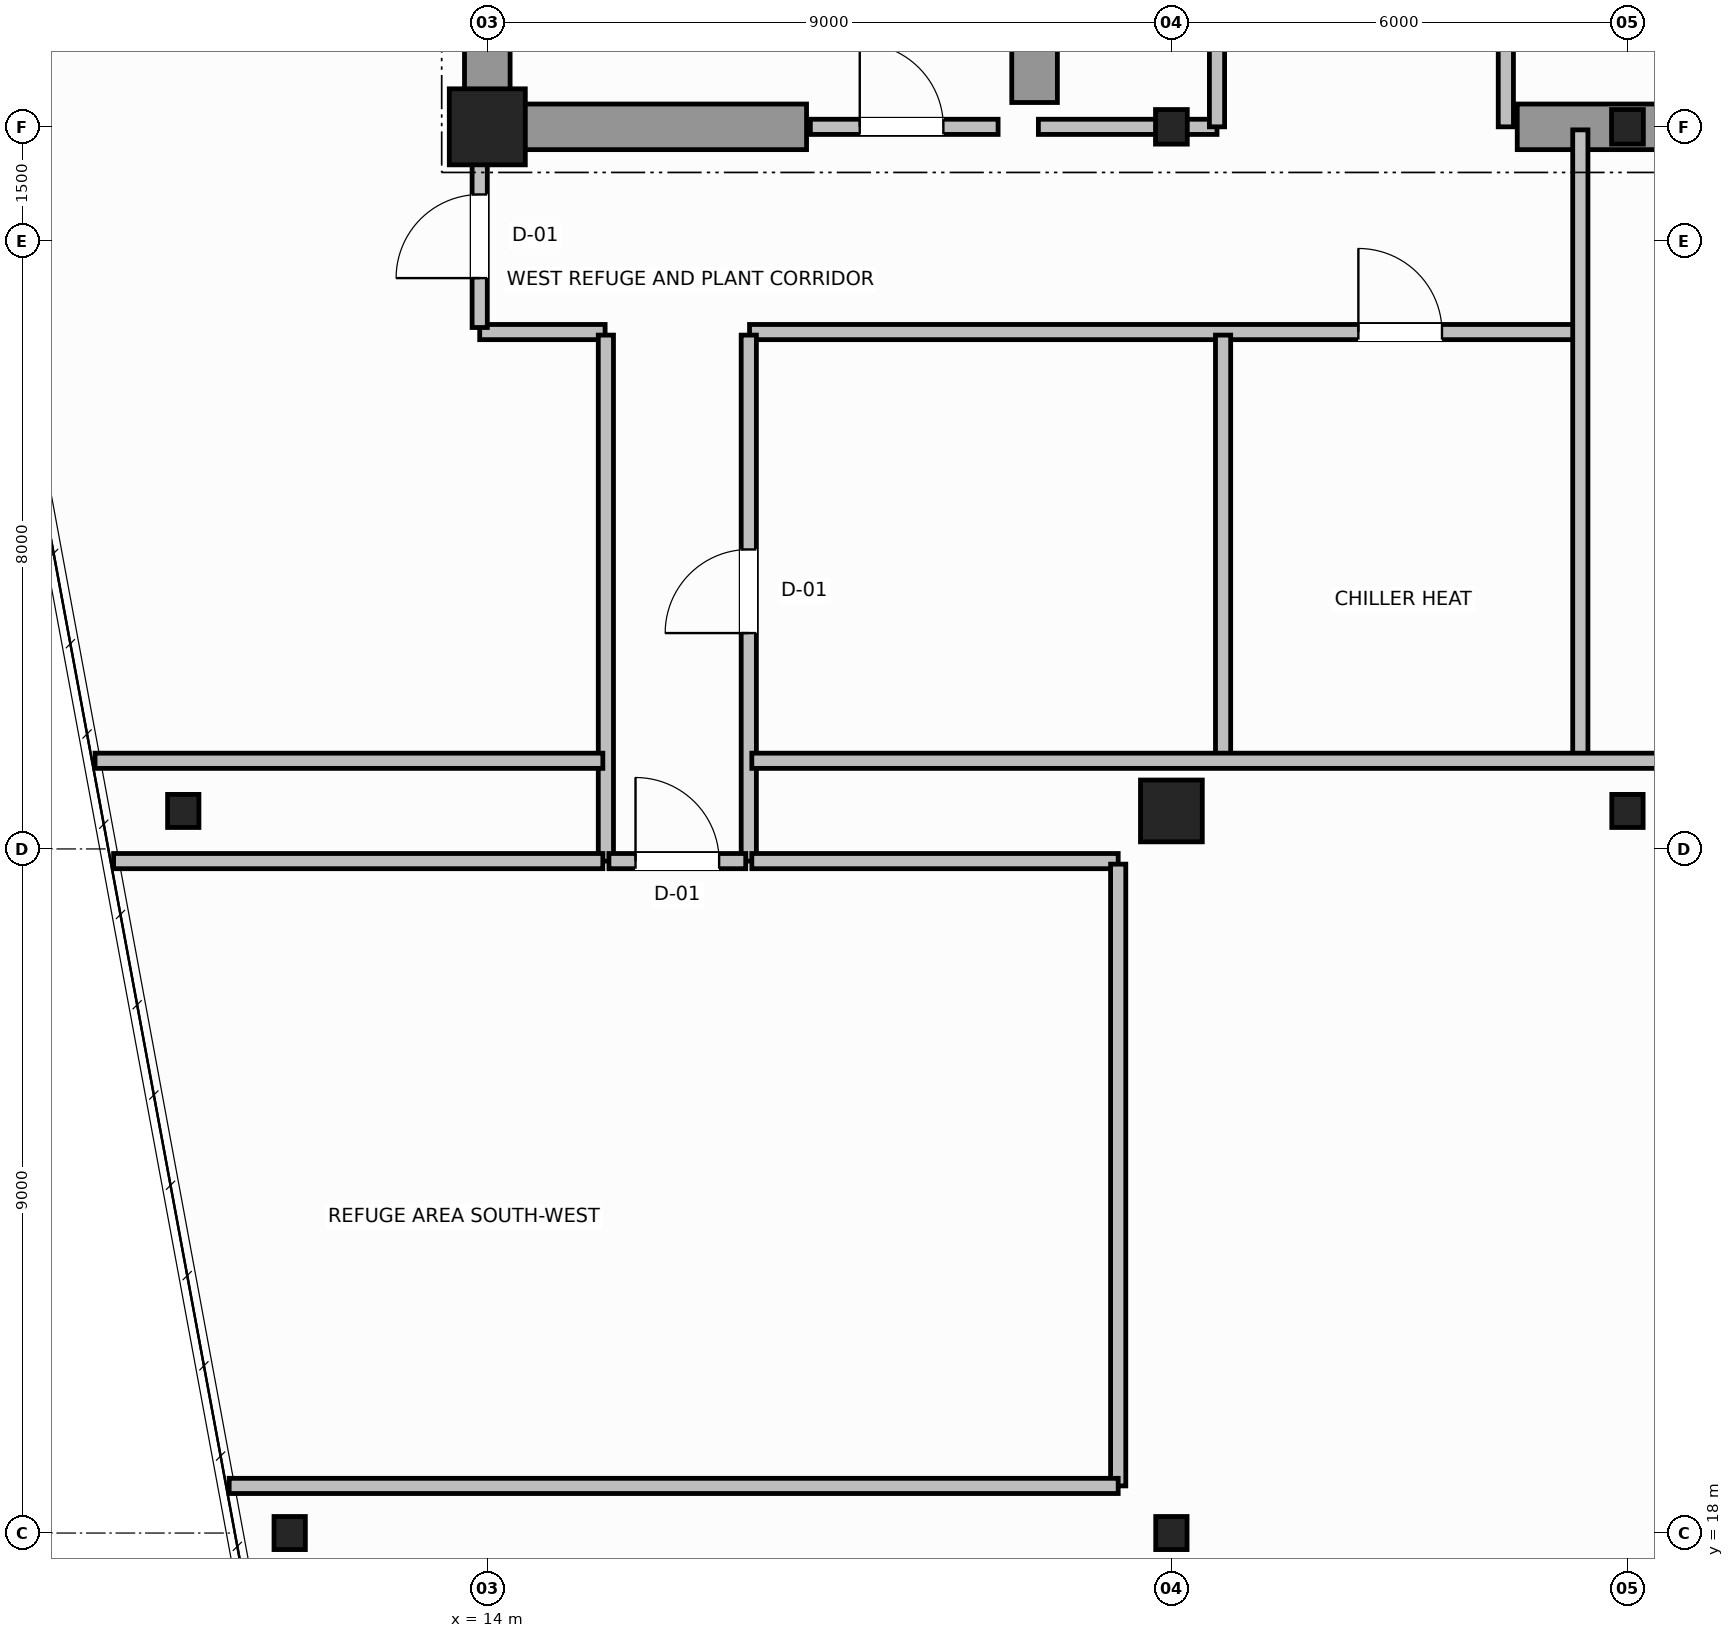
"""IFC4 building model, lengths in metres.
Left out: names, types, materials, properties, quantities, classifications, styles, units other than length and angle.
Written with IfcOpenShell. Run it as: python <this file> out.ifc"""

import sys

from ifc_helpers import new_model, si_unit, direction, frame, frame_2d, origin, origin_2d, place, context, subcontext, project, spatial, rectangle, hollow_circle, i_section, extrude, source, transform, mapped, element, fill, save


model = new_model("IFC4")
c1 = context("Model", 3, precision=1e-05, world=origin(), true_north=direction((0.0, 1.0)))
c2 = subcontext(c1, "Body", "Model", "MODEL_VIEW")
j1 = project(units=[si_unit("LENGTHUNIT", "METRE"), si_unit("PLANEANGLEUNIT", "RADIAN")], contexts=[c1])
p1 = place(None, origin())
s1 = spatial("IfcSite", under=j1, at=p1, CompositionType="ELEMENT")
p2 = place(p1, origin())
s2 = spatial("IfcBuilding", under=s1, at=p2, CompositionType="ELEMENT")
p3 = place(p2, frame((0.0, 0.0, 218.4)))
s3 = spatial("IfcBuildingStorey", under=s2, at=p3, CompositionType="ELEMENT", Elevation=218.4)
m1 = source(origin(), c2, "Body", "SweptSolid", [
    extrude(rectangle(XDim=1.0, YDim=1.0, at=origin_2d()), origin(), (0.0, 0.0, 1.0), 4.8),
])
p4 = place(p3, frame((14.0, 36.5, 0.0), z_axis=(0.0, 0.0, 1.0), x_axis=(1.0, 0.0, 0.0)))
e1 = element("IfcColumn", 1, at=p4, inside=s3, PredefinedType="COLUMN", context=c2, shape_type="MappedRepresentation", body=[
    mapped(m1, transform((0.0, 0.0, 0.0), scale=1.0)),
])
m2 = source(origin(), c2, "Body", "SweptSolid", [
    extrude(i_section(OverallWidth=0.418, OverallDepth=0.455, WebThickness=0.042, FlangeThickness=0.058, FilletRadius=0.015, at=origin_2d()), origin(), (0.0, 0.0, 1.0), 4.8),
])
for number, where, z_axis, x_axis in (
    (2, (23.0, 36.5, 0.0), (0.0, 0.0, 1.0), (1.0, 0.0, 0.0)),
    (3, (29.0, 36.5, 0.0), (0.0, 0.0, 1.0), (1.0, 0.0, 0.0)),
):
    element("IfcColumn", number, at=place(p3, frame(where, z_axis=z_axis, x_axis=x_axis)), inside=s3, PredefinedType="COLUMN", context=c2, shape_type="MappedRepresentation", body=[
        mapped(m2, transform((0.0, 0.0, 0.0), scale=1.0)),
    ])
m3 = source(origin(), c2, "Body", "SweptSolid", [
    extrude(i_section(OverallWidth=0.412, OverallDepth=0.435, WebThickness=0.036, FlangeThickness=0.05, FilletRadius=0.015, at=origin_2d()), origin(), (0.0, 0.0, 1.0), 4.8),
])
for number, where, z_axis, x_axis in (
    (4, (10.0, 27.5, 0.0), (0.0, 0.0, 1.0), (1.0, 0.0, 0.0)),
    (5, (11.4, 18.0, 0.0), (0.0, 0.0, 1.0), (1.0, 0.0, 0.0)),
):
    element("IfcColumn", number, at=place(p3, frame(where, z_axis=z_axis, x_axis=x_axis)), inside=s3, PredefinedType="COLUMN", context=c2, shape_type="MappedRepresentation", body=[
        mapped(m3, transform((0.0, 0.0, 0.0), scale=1.0)),
    ])
m4 = source(origin(), c2, "Body", "SweptSolid", [
    extrude(hollow_circle(Radius=0.406, WallThickness=0.04, at=origin_2d()), origin(), (0.0, 0.0, 1.0), 4.8),
])
p5 = place(p3, frame((23.0, 27.5, 0.0), z_axis=(0.0, 0.0, 1.0), x_axis=(1.0, 0.0, 0.0)))
e6 = element("IfcColumn", 6, at=p5, inside=s3, PredefinedType="COLUMN", context=c2, shape_type="MappedRepresentation", body=[
    mapped(m4, transform((0.0, 0.0, 0.0), scale=1.0)),
])
m5 = source(origin(), c2, "Body", "SweptSolid", [
    extrude(i_section(OverallWidth=0.412, OverallDepth=0.435, WebThickness=0.036, FlangeThickness=0.05, FilletRadius=0.015, at=origin_2d()), origin(), (0.0, 0.0, 1.0), 4.8),
])
for number, where, z_axis, x_axis in (
    (7, (29.0, 27.5, 0.0), (0.0, 0.0, 1.0), (1.0, 0.0, 0.0)),
    (8, (23.0, 18.0, 0.0), (0.0, 0.0, 1.0), (1.0, 0.0, 0.0)),
):
    element("IfcColumn", number, at=place(p3, frame(where, z_axis=z_axis, x_axis=x_axis)), inside=s3, PredefinedType="COLUMN", context=c2, shape_type="MappedRepresentation", body=[
        mapped(m5, transform((0.0, 0.0, 0.0), scale=1.0)),
    ])
p6 = place(p3, frame((14.0, 36.5, 0.0), z_axis=(0.0, 0.0, 1.0), x_axis=(0.0, 1.0, 0.0)))
e9 = element("IfcWall", 9, at=p6, inside=s3, PredefinedType="SHEAR", context=c2, shape_type="SweptSolid", body=[
    extrude(rectangle(XDim=14.5, YDim=0.6, at=frame_2d((7.25, 0.0))), origin(), (0.0, 0.0, 1.0), 4.8),
])
p7 = place(p3, frame((14.32, 36.5, 0.0), z_axis=(0.0, 0.0, 1.0), x_axis=(1.0, 0.0, 0.0)))
e10 = element("IfcWall", 10, at=p7, inside=s3, PredefinedType="SHEAR", context=c2, shape_type="SweptSolid", body=[
    extrude(rectangle(XDim=3.88, YDim=0.6, at=frame_2d((1.94, 0.0))), origin(), (0.0, 0.0, 1.0), 3.54),
])
p8 = place(p3, frame((27.55, 36.5, 0.0), z_axis=(0.0, 0.0, 1.0), x_axis=(1.0, 0.0, 0.0)))
e11 = element("IfcWall", 11, at=p8, inside=s3, PredefinedType="SHEAR", context=c2, shape_type="SweptSolid", body=[
    extrude(rectangle(XDim=4.5, YDim=0.6, at=frame_2d((2.25, 0.0))), origin(), (0.0, 0.0, 1.0), 4.8),
])
p9 = place(p3, frame((21.2, 36.82, 0.0), z_axis=(0.0, 0.0, 1.0), x_axis=(0.0, 1.0, 0.0)))
e12 = element("IfcWall", 12, at=p9, inside=s3, PredefinedType="SHEAR", context=c2, shape_type="SweptSolid", body=[
    extrude(rectangle(XDim=9.38, YDim=0.6, at=frame_2d((4.69, 0.0))), origin(), (0.0, 0.0, 1.0), 4.8),
])
p10 = place(p3, frame((18.25, 36.5, 0.0), z_axis=(0.0, 0.0, 1.0), x_axis=(1.0, 0.0, 0.0)))
e13 = element("IfcWall", 13, at=p10, inside=s3, PredefinedType="SOLIDWALL", context=c2, shape_type="SweptSolid", body=[
    extrude(rectangle(XDim=2.47, YDim=0.2, at=frame_2d((1.235, 0.0))), origin(), (0.0, 0.0, 1.0), 3.53),
])
p11 = place(p10, frame((0.65, 0.0, 0.0)))
e14 = element("IfcOpeningElement", 14, at=p11, cuts=e13, PredefinedType="OPENING", context=c2, shape_type="SweptSolid", body=[
    extrude(rectangle(XDim=1.1, YDim=2.15, at=frame_2d((0.55, 1.075))), frame((0.0, 0.11, 0.0), z_axis=(0.0, -1.0, 0.0), x_axis=(1.0, 0.0, 0.0)), (0.0, 0.0, 1.0), 0.22),
])
p12 = place(p3, frame((21.25, 36.5, 0.0), z_axis=(0.0, 0.0, 1.0), x_axis=(1.0, 0.0, 0.0)))
e15 = element("IfcWall", 15, at=p12, inside=s3, PredefinedType="SOLIDWALL", context=c2, shape_type="SweptSolid", body=[
    extrude(rectangle(XDim=2.35, YDim=0.2, at=frame_2d((1.175, 0.0))), origin(), (0.0, 0.0, 1.0), 3.53),
])
for number, where, z_axis, x_axis in (
    (16, (23.6, 36.5, 0.0), (0.0, 0.0, 1.0), (0.0, 1.0, 0.0)),
    (17, (27.4, 36.5, 0.0), (0.0, 0.0, 1.0), (0.0, 1.0, 0.0)),
):
    element("IfcWall", number, at=place(p3, frame(where, z_axis=z_axis, x_axis=x_axis)), inside=s3, PredefinedType="SOLIDWALL", context=c2, shape_type="SweptSolid", body=[
        extrude(rectangle(XDim=3.25, YDim=0.2, at=frame_2d((1.625, 0.0))), origin(), (0.0, 0.0, 1.0), 4.54),
    ])
p13 = place(p3, frame((13.9, 33.8, 0.0), z_axis=(0.0, 0.0, 1.0), x_axis=(1.0, 0.0, 0.0)))
e18 = element("IfcWall", 18, at=p13, inside=s3, PredefinedType="SOLIDWALL", context=c2, shape_type="SweptSolid", body=[
    extrude(rectangle(XDim=1.65, YDim=0.2, at=frame_2d((0.825, 0.0))), origin(), (0.0, 0.0, 1.0), 4.13),
])
p14 = place(p3, frame((17.45, 33.8, 0.0), z_axis=(0.0, 0.0, 1.0), x_axis=(1.0, 0.0, 0.0)))
e19 = element("IfcWall", 19, at=p14, inside=s3, PredefinedType="SOLIDWALL", context=c2, shape_type="SweptSolid", body=[
    extrude(rectangle(XDim=10.91, YDim=0.2, at=frame_2d((5.455, 0.0))), origin(), (0.0, 0.0, 1.0), 4.13),
])
p15 = place(p14, frame((8.01, 0.0, 0.0)))
e20 = element("IfcOpeningElement", 20, at=p15, cuts=e19, PredefinedType="OPENING", context=c2, shape_type="SweptSolid", body=[
    extrude(rectangle(XDim=1.1, YDim=2.15, at=frame_2d((0.55, 1.075))), frame((0.0, 0.11, 0.0), z_axis=(0.0, -1.0, 0.0), x_axis=(1.0, 0.0, 0.0)), (0.0, 0.0, 1.0), 0.22),
])
p16 = place(p3, frame((13.9, 33.86, 0.0), z_axis=(0.0, 0.0, 1.0), x_axis=(0.0, 1.0, 0.0)))
e21 = element("IfcWall", 21, at=p16, inside=s3, PredefinedType="SOLIDWALL", context=c2, shape_type="SweptSolid", body=[
    extrude(rectangle(XDim=2.58, YDim=0.2, at=frame_2d((1.29, 0.0))), origin(), (0.0, 0.0, 1.0), 4.54),
])
p17 = place(p16, frame((0.65, 0.0, 0.0)))
e22 = element("IfcOpeningElement", 22, at=p17, cuts=e21, PredefinedType="OPENING", context=c2, shape_type="SweptSolid", body=[
    extrude(rectangle(XDim=1.1, YDim=2.15, at=frame_2d((0.55, 1.075))), frame((0.0, 0.11, 0.0), z_axis=(0.0, -1.0, 0.0), x_axis=(1.0, 0.0, 0.0)), (0.0, 0.0, 1.0), 0.22),
])
p18 = place(p3, frame((15.56, 26.84, 0.0), z_axis=(0.0, 0.0, 1.0), x_axis=(0.0, 1.0, 0.0)))
e23 = element("IfcWall", 23, at=p18, inside=s3, PredefinedType="SOLIDWALL", context=c2, shape_type="SweptSolid", body=[
    extrude(rectangle(XDim=6.92, YDim=0.2, at=frame_2d((3.46, 0.0))), origin(), (0.0, 0.0, 1.0), 4.54),
])
p19 = place(p3, frame((17.44, 26.84, 0.0), z_axis=(0.0, 0.0, 1.0), x_axis=(0.0, 1.0, 0.0)))
e24 = element("IfcWall", 24, at=p19, inside=s3, PredefinedType="SOLIDWALL", context=c2, shape_type="SweptSolid", body=[
    extrude(rectangle(XDim=6.92, YDim=0.2, at=frame_2d((3.46, 0.0))), origin(), (0.0, 0.0, 1.0), 4.54),
])
p20 = place(p19, frame((3.0, 0.0, 0.0)))
e25 = element("IfcOpeningElement", 25, at=p20, cuts=e24, PredefinedType="OPENING", context=c2, shape_type="SweptSolid", body=[
    extrude(rectangle(XDim=1.1, YDim=2.15, at=frame_2d((0.55, 1.075))), frame((0.0, 0.11, 0.0), z_axis=(0.0, -1.0, 0.0), x_axis=(1.0, 0.0, 0.0)), (0.0, 0.0, 1.0), 0.22),
])
p21 = place(p3, frame((15.6, 26.84, 0.0), z_axis=(0.0, 0.0, 1.0), x_axis=(1.0, 0.0, 0.0)))
e26 = element("IfcWall", 26, at=p21, inside=s3, PredefinedType="SOLIDWALL", context=c2, shape_type="SweptSolid", body=[
    extrude(rectangle(XDim=1.8, YDim=0.2, at=frame_2d((0.9, 0.0))), origin(), (0.0, 0.0, 1.0), 4.54),
])
p22 = place(p21, frame((0.35, 0.0, 0.0)))
e27 = element("IfcOpeningElement", 27, at=p22, cuts=e26, PredefinedType="OPENING", context=c2, shape_type="SweptSolid", body=[
    extrude(rectangle(XDim=1.1, YDim=2.15, at=frame_2d((0.55, 1.075))), frame((0.0, 0.11, 0.0), z_axis=(0.0, -1.0, 0.0), x_axis=(1.0, 0.0, 0.0)), (0.0, 0.0, 1.0), 0.22),
])
p23 = place(p3, frame((28.38, 28.16, 0.0), z_axis=(0.0, 0.0, 1.0), x_axis=(0.0, 1.0, 0.0)))
e28 = element("IfcWall", 28, at=p23, inside=s3, PredefinedType="SOLIDWALL", context=c2, shape_type="SweptSolid", body=[
    extrude(rectangle(XDim=8.3, YDim=0.2, at=frame_2d((4.15, 0.0))), origin(), (0.0, 0.0, 1.0), 4.54),
])
p24 = place(p3, frame((23.68, 28.16, 0.0), z_axis=(0.0, 0.0, 1.0), x_axis=(0.0, 1.0, 0.0)))
e29 = element("IfcWall", 29, at=p24, inside=s3, PredefinedType="SOLIDWALL", context=c2, shape_type="SweptSolid", body=[
    extrude(rectangle(XDim=5.6, YDim=0.2, at=frame_2d((2.8, 0.0))), origin(), (0.0, 0.0, 1.0), 4.54),
])
p25 = place(p3, frame((8.839, 28.16, 0.0), z_axis=(0.0, 0.0, 1.0), x_axis=(1.0, 0.0, 0.0)))
e30 = element("IfcWall", 30, at=p25, inside=s3, PredefinedType="SOLIDWALL", context=c2, shape_type="SweptSolid", body=[
    extrude(rectangle(XDim=6.681, YDim=0.2, at=frame_2d((3.34, 0.0))), origin(), (0.0, 0.0, 1.0), 4.54),
])
p26 = place(p3, frame((17.48, 28.16, 0.0), z_axis=(0.0, 0.0, 1.0), x_axis=(1.0, 0.0, 0.0)))
e31 = element("IfcWall", 31, at=p26, inside=s3, PredefinedType="SOLIDWALL", context=c2, shape_type="SweptSolid", body=[
    extrude(rectangle(XDim=33.04, YDim=0.2, at=frame_2d((16.52, 0.0))), origin(), (0.0, 0.0, 1.0), 4.54),
])
p27 = place(p3, frame((9.083, 26.84, 0.0), z_axis=(0.0, 0.0, 1.0), x_axis=(1.0, 0.0, 0.0)))
e32 = element("IfcWall", 32, at=p27, inside=s3, PredefinedType="SOLIDWALL", context=c2, shape_type="SweptSolid", body=[
    extrude(rectangle(XDim=6.437, YDim=0.2, at=frame_2d((3.218, 0.0))), origin(), (0.0, 0.0, 1.0), 4.54),
])
p28 = place(p3, frame((17.48, 26.84, 0.0), z_axis=(0.0, 0.0, 1.0), x_axis=(1.0, 0.0, 0.0)))
e33 = element("IfcWall", 33, at=p28, inside=s3, PredefinedType="SOLIDWALL", context=c2, shape_type="SweptSolid", body=[
    extrude(rectangle(XDim=4.82, YDim=0.2, at=frame_2d((2.41, 0.0))), origin(), (0.0, 0.0, 1.0), 4.54),
])
p29 = place(p3, frame((22.3, 18.62, 0.0), z_axis=(0.0, 0.0, 1.0), x_axis=(0.0, 1.0, 0.0)))
e34 = element("IfcWall", 34, at=p29, inside=s3, PredefinedType="SOLIDWALL", context=c2, shape_type="SweptSolid", body=[
    extrude(rectangle(XDim=8.18, YDim=0.2, at=frame_2d((4.09, 0.0))), origin(), (0.0, 0.0, 1.0), 4.54),
])
p30 = place(p3, frame((10.604, 18.62, 0.0), z_axis=(0.0, 0.0, 1.0), x_axis=(1.0, 0.0, 0.0)))
e35 = element("IfcWall", 35, at=p30, inside=s3, PredefinedType="SOLIDWALL", context=c2, shape_type="SweptSolid", body=[
    extrude(rectangle(XDim=11.696, YDim=0.2, at=frame_2d((5.848, 0.0))), origin(), (0.0, 0.0, 1.0), 4.54),
])
m6 = source(origin(), c2, "Body", "SweptSolid", [
    extrude(rectangle(XDim=1.1, YDim=2.15, at=frame_2d((0.55, 1.075))), frame((0.0, 0.025, 0.0), z_axis=(0.0, -1.0, 0.0), x_axis=(1.0, 0.0, 0.0)), (0.0, 0.0, 1.0), 0.05),
])
p31 = place(p11, origin())
e36 = element("IfcDoor", 36, at=p31, inside=s3, OperationType="SINGLE_SWING_RIGHT", PredefinedType="DOOR", context=c2, shape_type="MappedRepresentation", body=[
    mapped(m6, transform((0.0, 0.0, 0.0), scale=1.0)),
])
fill(e14, e36)
p32 = place(p17, origin())
e37 = element("IfcDoor", 37, at=p32, inside=s3, OperationType="SINGLE_SWING_LEFT", PredefinedType="DOOR", context=c2, shape_type="MappedRepresentation", body=[
    mapped(m6, transform((0.0, 0.0, 0.0), scale=1.0)),
])
fill(e22, e37)
p33 = place(p20, origin())
e38 = element("IfcDoor", 38, at=p33, inside=s3, OperationType="SINGLE_SWING_RIGHT", PredefinedType="DOOR", context=c2, shape_type="MappedRepresentation", body=[
    mapped(m6, transform((0.0, 0.0, 0.0), scale=1.0)),
])
fill(e25, e38)
p34 = place(p22, origin())
e39 = element("IfcDoor", 39, at=p34, inside=s3, OperationType="SINGLE_SWING_LEFT", PredefinedType="DOOR", context=c2, shape_type="MappedRepresentation", body=[
    mapped(m6, transform((0.0, 0.0, 0.0), scale=1.0)),
])
fill(e27, e39)
p35 = place(p15, origin())
e40 = element("IfcDoor", 40, at=p35, inside=s3, OperationType="SINGLE_SWING_LEFT", PredefinedType="DOOR", context=c2, shape_type="MappedRepresentation", body=[
    mapped(m6, transform((0.0, 0.0, 0.0), scale=1.0)),
])
fill(e20, e40)
save(model, sys.argv[1])
